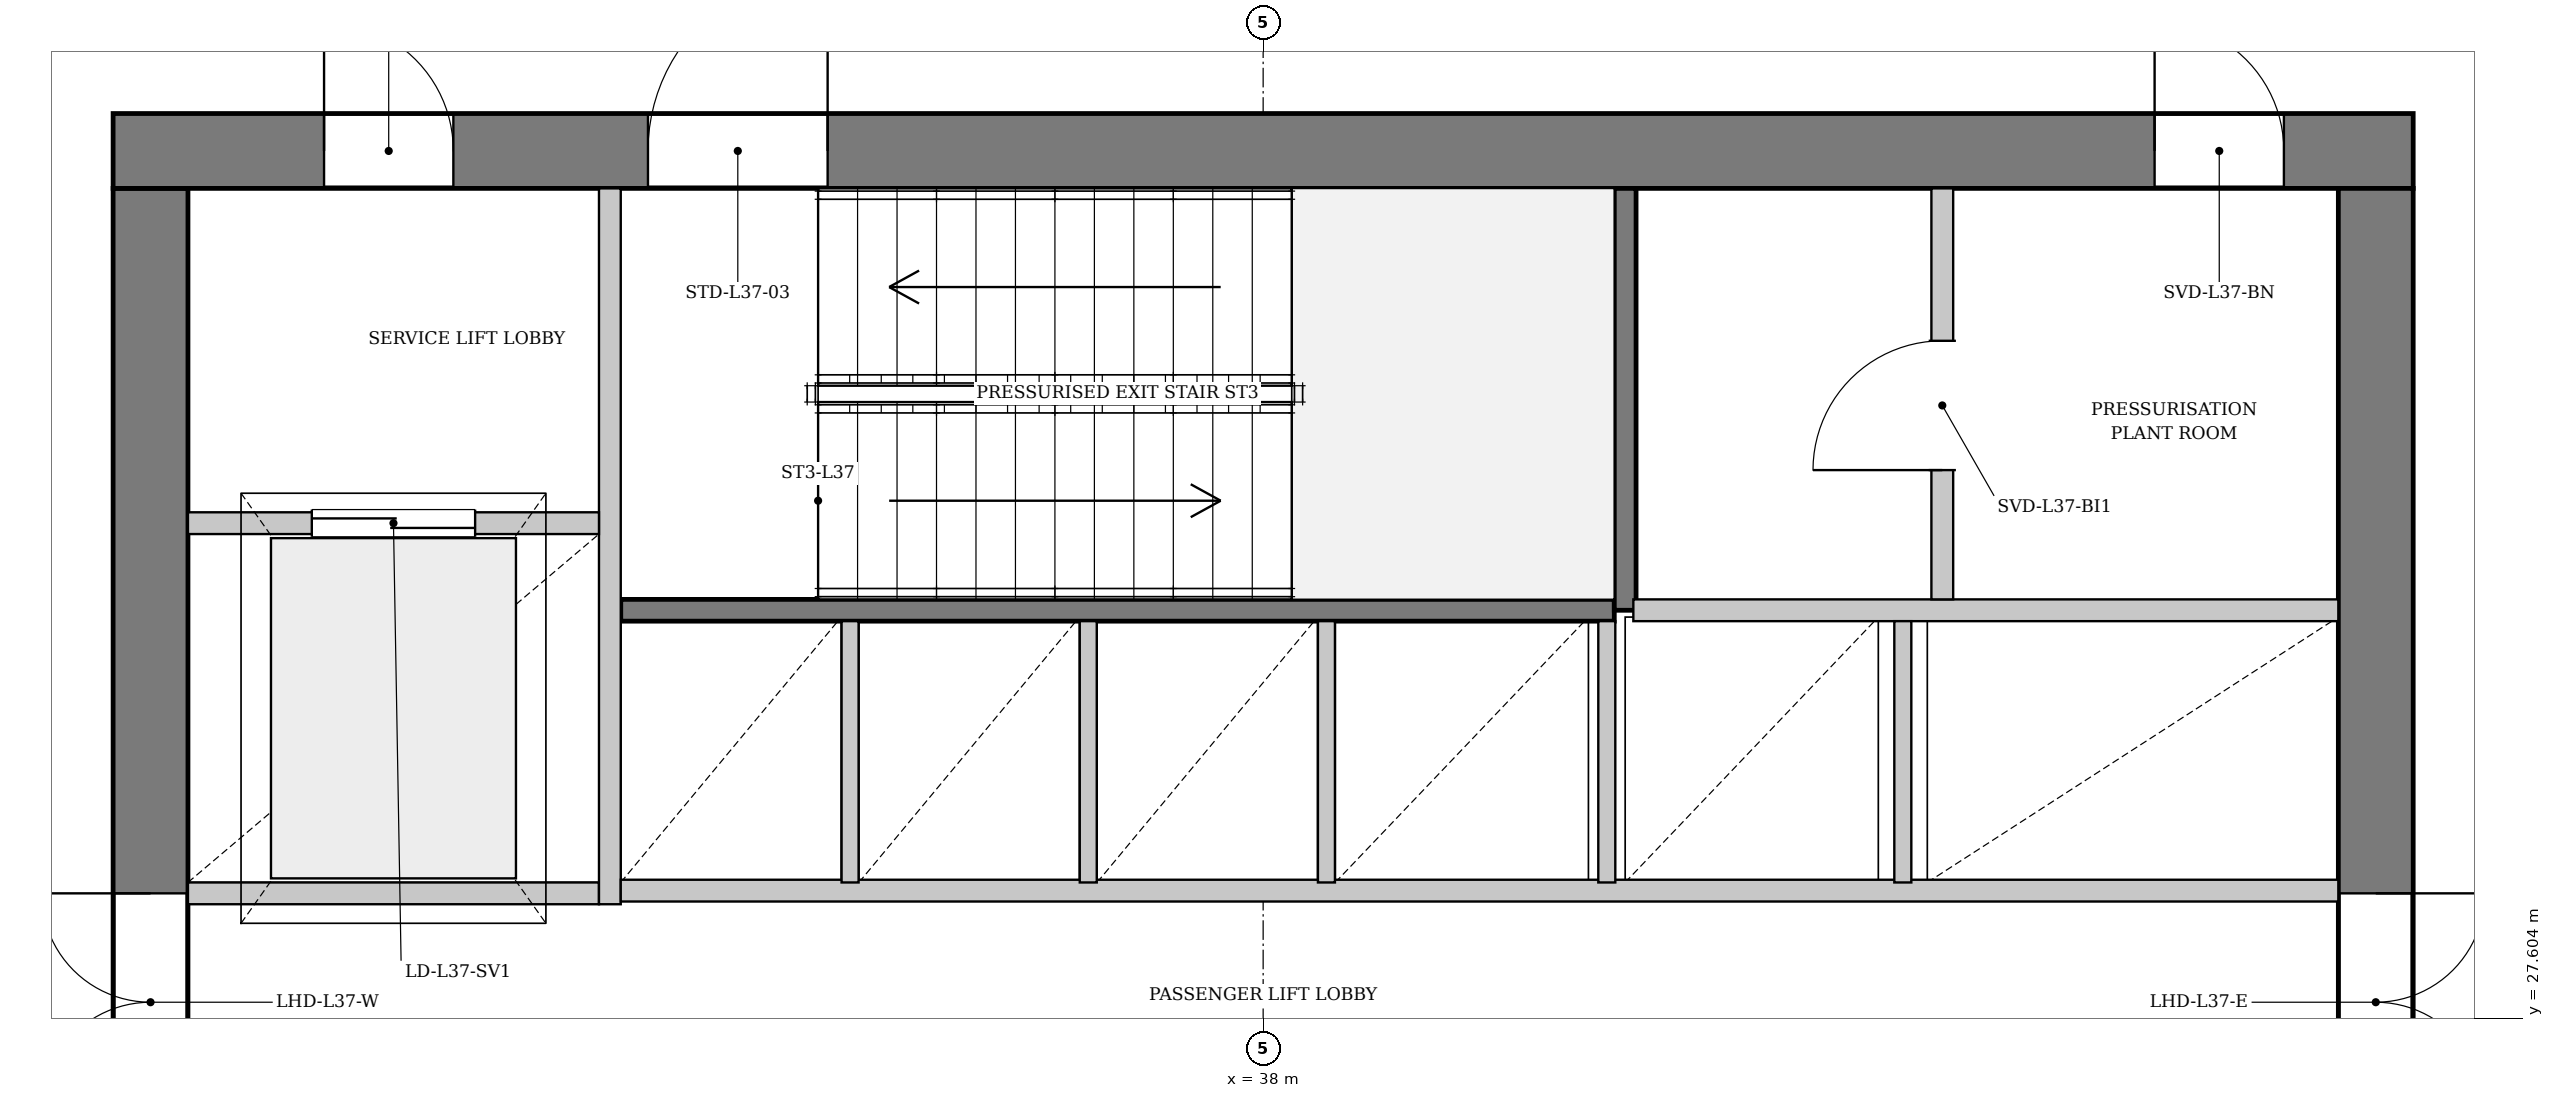
"""IFC4 building model, lengths in metres.
Left out: names, types, materials, properties, quantities, classifications, styles, units other than length and angle.
Written with IfcOpenShell. Run it as: python <this file> out.ifc"""

import sys

from ifc_helpers import new_model, si_unit, direction, frame, frame_2d, origin, place, context, subcontext, project, spatial, rectangle, extrude, source, transform, mapped, element, fill, save


model = new_model("IFC4")
c1 = context("Model", 3, precision=1e-05, world=origin(), true_north=direction((0.0, 1.0)))
c2 = subcontext(c1, "Body", "Model", "MODEL_VIEW")
j1 = project(units=[si_unit("LENGTHUNIT", "METRE"), si_unit("PLANEANGLEUNIT", "RADIAN")], contexts=[c1])
p1 = place(None, origin())
s1 = spatial("IfcSite", under=j1, at=p1, CompositionType="ELEMENT")
p2 = place(p1, origin())
s2 = spatial("IfcBuilding", under=s1, at=p2, CompositionType="ELEMENT")
p3 = place(p2, frame((0.0, 0.0, 142.1)))
s3 = spatial("IfcBuildingStorey", under=s2, at=p3, CompositionType="ELEMENT", Elevation=142.1)
p4 = place(p3, frame((29.825, 19.5, 0.0), z_axis=(0.0, 0.0, 1.0), x_axis=(0.0, 1.0, 0.0)))
e1 = element("IfcWall", 1, at=p4, inside=s3, PredefinedType="SHEAR", context=c2, shape_type="SweptSolid", body=[
    extrude(rectangle(XDim=14.2, YDim=0.55, at=frame_2d((7.1, 0.0))), origin(), (0.0, 0.0, 1.0), 4.25),
])
p5 = place(p4, frame((7.42, 0.0, 0.0)))
e2 = element("IfcOpeningElement", 2, at=p5, cuts=e1, PredefinedType="OPENING", context=c2, shape_type="SweptSolid", body=[
    extrude(rectangle(XDim=1.6, YDim=2.2, at=frame_2d((0.8, 1.1))), frame((0.0, 0.285, 0.0), z_axis=(0.0, -1.0, 0.0), x_axis=(1.0, 0.0, 0.0)), (0.0, 0.0, 1.0), 0.57),
])
p6 = place(p3, frame((29.55, 33.975, 0.0), z_axis=(0.0, 0.0, 1.0), x_axis=(1.0, 0.0, 0.0)))
e3 = element("IfcWall", 3, at=p6, inside=s3, PredefinedType="SHEAR", context=c2, shape_type="SweptSolid", body=[
    extrude(rectangle(XDim=16.9, YDim=0.55, at=frame_2d((8.45, 0.0))), origin(), (0.0, 0.0, 1.0), 4.25),
])
p7 = place(p6, frame((1.55, 0.0, 0.0)))
e4 = element("IfcOpeningElement", 4, at=p7, cuts=e3, PredefinedType="OPENING", context=c2, shape_type="SweptSolid", body=[
    extrude(rectangle(XDim=0.95, YDim=2.1, at=frame_2d((0.475, 1.05))), frame((0.0, 0.285, 0.0), z_axis=(0.0, -1.0, 0.0), x_axis=(1.0, 0.0, 0.0)), (0.0, 0.0, 1.0), 0.57),
])
p8 = place(p6, frame((3.93, 0.0, 0.0)))
e5 = element("IfcOpeningElement", 5, at=p8, cuts=e3, PredefinedType="OPENING", context=c2, shape_type="SweptSolid", body=[
    extrude(rectangle(XDim=1.32, YDim=2.2, at=frame_2d((0.66, 1.1))), frame((0.0, 0.285, 0.0), z_axis=(0.0, -1.0, 0.0), x_axis=(1.0, 0.0, 0.0)), (0.0, 0.0, 1.0), 0.57),
])
p9 = place(p6, frame((15.0, 0.0, 0.0)))
e6 = element("IfcOpeningElement", 6, at=p9, cuts=e3, PredefinedType="OPENING", context=c2, shape_type="SweptSolid", body=[
    extrude(rectangle(XDim=0.95, YDim=2.1, at=frame_2d((0.475, 1.05))), frame((0.0, 0.285, 0.0), z_axis=(0.0, -1.0, 0.0), x_axis=(1.0, 0.0, 0.0)), (0.0, 0.0, 1.0), 0.57),
])
p10 = place(p3, frame((46.175, 33.7, 0.0), z_axis=(0.0, 0.0, 1.0), x_axis=(0.0, -1.0, 0.0)))
e7 = element("IfcWall", 7, at=p10, inside=s3, PredefinedType="SHEAR", context=c2, shape_type="SweptSolid", body=[
    extrude(rectangle(XDim=14.2, YDim=0.55, at=frame_2d((7.1, 0.0))), origin(), (0.0, 0.0, 1.0), 4.25),
])
p11 = place(p10, frame((5.18, 0.0, 0.0)))
e8 = element("IfcOpeningElement", 8, at=p11, cuts=e7, PredefinedType="OPENING", context=c2, shape_type="SweptSolid", body=[
    extrude(rectangle(XDim=1.6, YDim=2.2, at=frame_2d((0.8, 1.1))), frame((0.0, 0.285, 0.0), z_axis=(0.0, -1.0, 0.0), x_axis=(1.0, 0.0, 0.0)), (0.0, 0.0, 1.0), 0.57),
])
p12 = place(p3, frame((33.28, 30.6, 0.0), z_axis=(0.0, 0.0, 1.0), x_axis=(1.0, 0.0, 0.0)))
e9 = element("IfcWall", 9, at=p12, inside=s3, PredefinedType="PARTITIONING", context=c2, shape_type="SweptSolid", body=[
    extrude(rectangle(XDim=7.3, YDim=0.16, at=frame_2d((3.65, 0.0))), origin(), (0.0, 0.0, 1.0), 4.25),
])
p13 = place(p3, frame((40.66, 30.6, 0.0), z_axis=(0.0, 0.0, 1.0), x_axis=(0.0, 1.0, 0.0)))
e10 = element("IfcWall", 10, at=p13, inside=s3, PredefinedType="PARTITIONING", context=c2, shape_type="SweptSolid", body=[
    extrude(rectangle(XDim=3.1, YDim=0.16, at=frame_2d((1.55, 0.0))), origin(), (0.0, 0.0, 1.0), 4.25),
])
p14 = place(p3, frame((30.1, 28.52, 0.0), z_axis=(0.0, 0.0, 1.0), x_axis=(1.0, 0.0, 0.0)))
e11 = element("IfcWall", 11, at=p14, inside=s3, PredefinedType="PARTITIONING", context=c2, shape_type="SweptSolid", body=[
    extrude(rectangle(XDim=3.02, YDim=0.16, at=frame_2d((1.51, 0.0))), origin(), (0.0, 0.0, 1.0), 4.25),
])
p15 = place(p3, frame((33.2, 28.44, 0.0), z_axis=(0.0, 0.0, 1.0), x_axis=(0.0, 1.0, 0.0)))
e12 = element("IfcWall", 12, at=p15, inside=s3, PredefinedType="PARTITIONING", context=c2, shape_type="SweptSolid", body=[
    extrude(rectangle(XDim=5.26, YDim=0.16, at=frame_2d((2.63, 0.0))), origin(), (0.0, 0.0, 1.0), 4.25),
])
p16 = place(p3, frame((30.1, 31.24, 0.0), z_axis=(0.0, 0.0, 1.0), x_axis=(1.0, 0.0, 0.0)))
e13 = element("IfcWall", 13, at=p16, inside=s3, PredefinedType="PARTITIONING", context=c2, shape_type="SweptSolid", body=[
    extrude(rectangle(XDim=3.02, YDim=0.16, at=frame_2d((1.51, 0.0))), origin(), (0.0, 0.0, 1.0), 4.25),
])
p17 = place(p16, frame((0.91, 0.0, 0.0)))
e14 = element("IfcOpeningElement", 14, at=p17, cuts=e13, PredefinedType="OPENING", context=c2, shape_type="SweptSolid", body=[
    extrude(rectangle(XDim=1.2, YDim=2.2, at=frame_2d((0.6, 1.1))), frame((0.0, 0.09, 0.0), z_axis=(0.0, -1.0, 0.0), x_axis=(1.0, 0.0, 0.0)), (0.0, 0.0, 1.0), 0.18),
])
p18 = place(p3, frame((33.28, 28.54, 0.0), z_axis=(0.0, 0.0, 1.0), x_axis=(1.0, 0.0, 0.0)))
e15 = element("IfcWall", 15, at=p18, inside=s3, PredefinedType="PARTITIONING", context=c2, shape_type="SweptSolid", body=[
    extrude(rectangle(XDim=12.62, YDim=0.16, at=frame_2d((6.31, 0.0))), origin(), (0.0, 0.0, 1.0), 4.25),
])
p19 = place(p3, frame((40.72, 30.6, 0.0), z_axis=(0.0, 0.0, 1.0), x_axis=(1.0, 0.0, 0.0)))
e16 = element("IfcWall", 16, at=p19, inside=s3, PredefinedType="PARTITIONING", context=c2, shape_type="SweptSolid", body=[
    extrude(rectangle(XDim=5.18, YDim=0.16, at=frame_2d((2.59, 0.0))), origin(), (0.0, 0.0, 1.0), 4.25),
])
for number, where, z_axis, x_axis in (
    (17, (34.965, 28.6, 0.0), (0.0, 0.0, 1.0), (0.0, 1.0, 0.0)),
    (18, (36.715, 28.6, 0.0), (0.0, 0.0, 1.0), (0.0, 1.0, 0.0)),
    (19, (38.465, 28.6, 0.0), (0.0, 0.0, 1.0), (0.0, 1.0, 0.0)),
    (20, (40.525, 28.6, 0.0), (0.0, 0.0, 1.0), (0.0, 1.0, 0.0)),
    (21, (42.7, 28.6, 0.0), (0.0, 0.0, 1.0), (0.0, 1.0, 0.0)),
):
    element("IfcWall", number, at=place(p3, frame(where, z_axis=z_axis, x_axis=x_axis)), inside=s3, PredefinedType="PARTITIONING", context=c2, shape_type="SweptSolid", body=[
        extrude(rectangle(XDim=1.92, YDim=0.125, at=frame_2d((0.96, 0.0))), origin(), (0.0, 0.0, 1.0), 4.25),
    ])
p20 = place(p3, frame((42.99, 30.68, 0.0), z_axis=(0.0, 0.0, 1.0), x_axis=(0.0, 1.0, 0.0)))
e22 = element("IfcWall", 22, at=p20, inside=s3, PredefinedType="PARTITIONING", context=c2, shape_type="SweptSolid", body=[
    extrude(rectangle(XDim=3.02, YDim=0.16, at=frame_2d((1.51, 0.0))), origin(), (0.0, 0.0, 1.0), 4.25),
])
p21 = place(p20, frame((0.95, 0.0, 0.0)))
e23 = element("IfcOpeningElement", 23, at=p21, cuts=e22, PredefinedType="OPENING", context=c2, shape_type="SweptSolid", body=[
    extrude(rectangle(XDim=0.95, YDim=2.1, at=frame_2d((0.475, 1.05))), frame((0.0, 0.09, 0.0), z_axis=(0.0, -1.0, 0.0), x_axis=(1.0, 0.0, 0.0)), (0.0, 0.0, 1.0), 0.18),
])
m1 = source(origin(), c2, "Body", "SweptSolid", [
    extrude(rectangle(XDim=1.6, YDim=2.2, at=frame_2d((0.8, 1.1))), frame((0.0, 0.025, 0.0), z_axis=(0.0, -1.0, 0.0), x_axis=(1.0, 0.0, 0.0)), (0.0, 0.0, 1.0), 0.05),
])
p22 = place(p5, origin())
e24 = element("IfcDoor", 24, at=p22, inside=s3, OperationType="DOUBLE_DOOR_SINGLE_SWING", PredefinedType="DOOR", context=c2, shape_type="MappedRepresentation", body=[
    mapped(m1, transform((0.0, 0.0, 0.0), x_axis=(1.0, 0.0, 0.0), y_axis=(0.0, 1.0, 0.0), z_axis=(0.0, 0.0, 1.0), scale=1.0)),
])
fill(e2, e24)
m2 = source(origin(), c2, "Body", "SweptSolid", [
    extrude(rectangle(XDim=0.95, YDim=2.1, at=frame_2d((0.475, 1.05))), frame((0.0, 0.025, 0.0), z_axis=(0.0, -1.0, 0.0), x_axis=(1.0, 0.0, 0.0)), (0.0, 0.0, 1.0), 0.05),
])
p23 = place(p7, origin())
e25 = element("IfcDoor", 25, at=p23, inside=s3, OperationType="SINGLE_SWING_LEFT", PredefinedType="DOOR", context=c2, shape_type="MappedRepresentation", body=[
    mapped(m2, transform((0.0, 0.0, 0.0), x_axis=(1.0, 0.0, 0.0), y_axis=(0.0, 1.0, 0.0), z_axis=(0.0, 0.0, 1.0), scale=1.0)),
])
fill(e4, e25)
m3 = source(origin(), c2, "Body", "SweptSolid", [
    extrude(rectangle(XDim=1.32, YDim=2.2, at=frame_2d((0.66, 1.1))), frame((0.0, 0.025, 0.0), z_axis=(0.0, -1.0, 0.0), x_axis=(1.0, 0.0, 0.0)), (0.0, 0.0, 1.0), 0.05),
])
p24 = place(p8, origin())
e26 = element("IfcDoor", 26, at=p24, inside=s3, OperationType="SINGLE_SWING_RIGHT", PredefinedType="DOOR", context=c2, shape_type="MappedRepresentation", body=[
    mapped(m3, transform((0.0, 0.0, 0.0), x_axis=(1.0, 0.0, 0.0), y_axis=(0.0, 1.0, 0.0), z_axis=(0.0, 0.0, 1.0), scale=1.0)),
])
fill(e5, e26)
p25 = place(p11, origin())
e27 = element("IfcDoor", 27, at=p25, inside=s3, OperationType="DOUBLE_DOOR_SINGLE_SWING", PredefinedType="DOOR", context=c2, shape_type="MappedRepresentation", body=[
    mapped(m1, transform((0.0, 0.0, 0.0), x_axis=(1.0, 0.0, 0.0), y_axis=(0.0, 1.0, 0.0), z_axis=(0.0, 0.0, 1.0), scale=1.0)),
])
fill(e8, e27)
m4 = source(origin(), c2, "Body", "SweptSolid", [
    extrude(rectangle(XDim=1.2, YDim=2.2, at=frame_2d((0.6, 1.1))), frame((0.0, 0.025, 0.0), z_axis=(0.0, -1.0, 0.0), x_axis=(1.0, 0.0, 0.0)), (0.0, 0.0, 1.0), 0.05),
])
p26 = place(p17, origin())
e28 = element("IfcDoor", 28, at=p26, inside=s3, OperationType="DOUBLE_DOOR_SLIDING", PredefinedType="DOOR", context=c2, shape_type="MappedRepresentation", body=[
    mapped(m4, transform((0.0, 0.0, 0.0), x_axis=(1.0, 0.0, 0.0), y_axis=(0.0, 1.0, 0.0), z_axis=(0.0, 0.0, 1.0), scale=1.0)),
])
fill(e14, e28)
p27 = place(p21, origin())
e29 = element("IfcDoor", 29, at=p27, inside=s3, OperationType="SINGLE_SWING_LEFT", PredefinedType="DOOR", context=c2, shape_type="MappedRepresentation", body=[
    mapped(m2, transform((0.0, 0.0, 0.0), x_axis=(1.0, 0.0, 0.0), y_axis=(0.0, 1.0, 0.0), z_axis=(0.0, 0.0, 1.0), scale=1.0)),
])
fill(e23, e29)
p28 = place(p9, origin())
e30 = element("IfcDoor", 30, at=p28, inside=s3, OperationType="SINGLE_SWING_LEFT", PredefinedType="DOOR", context=c2, shape_type="MappedRepresentation", body=[
    mapped(m2, transform((0.0, 0.0, 0.0), x_axis=(1.0, 0.0, 0.0), y_axis=(0.0, 1.0, 0.0), z_axis=(0.0, 0.0, 1.0), scale=1.0)),
])
fill(e6, e30)
save(model, sys.argv[1])
